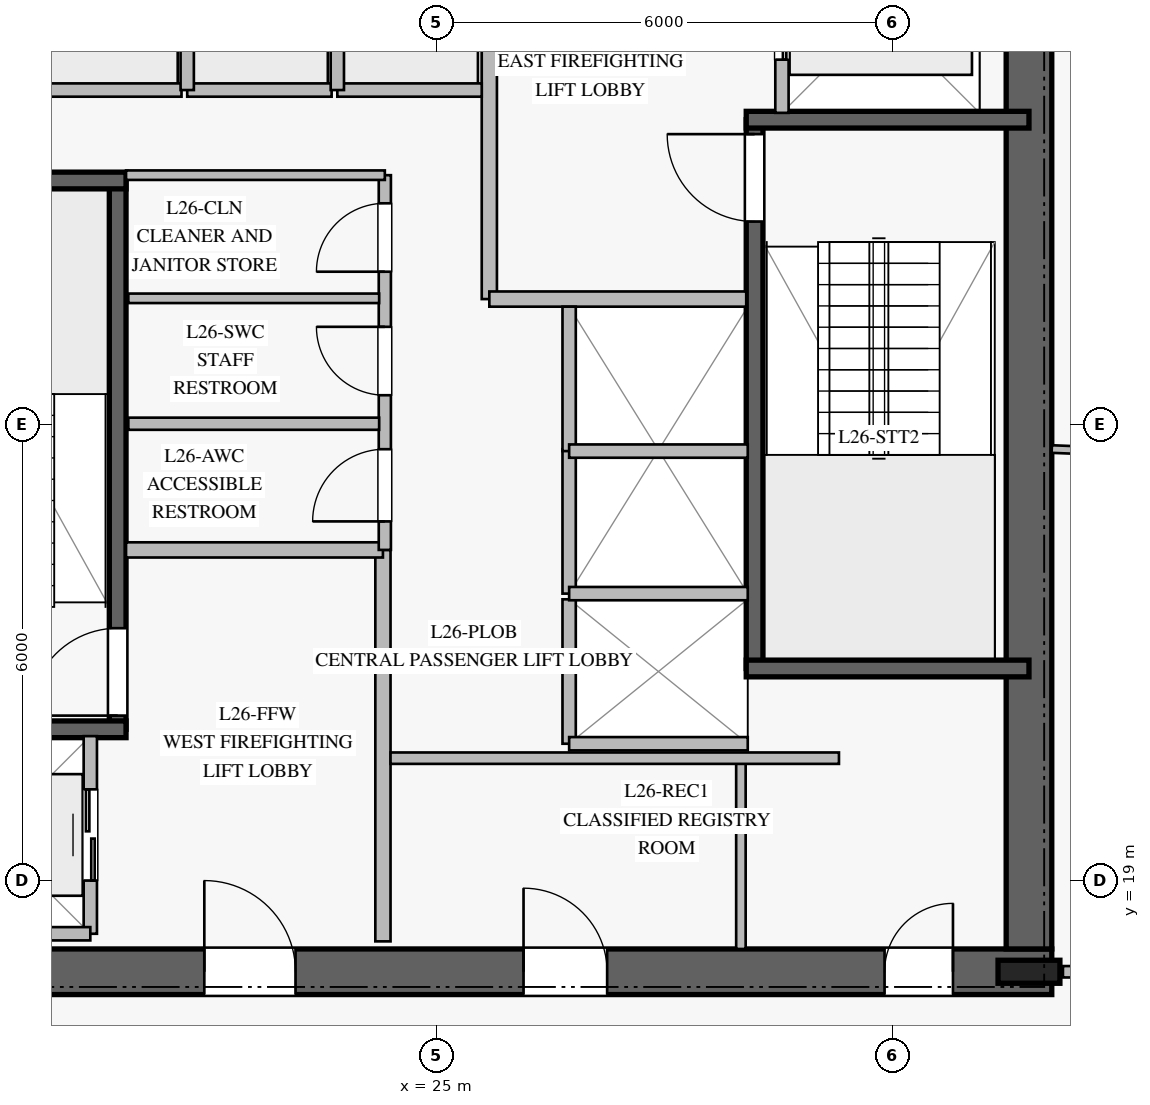
"""IFC4 building model, lengths in metres.
Left out: names, types, materials, properties, quantities, classifications, styles, units other than length and angle.
Written with IfcOpenShell. Run it as: python <this file> out.ifc"""

import sys

from ifc_helpers import new_model, si_unit, direction, frame, frame_2d, origin, origin_2d, place, context, subcontext, project, spatial, rectangle, i_section, extrude, element, fill, save


model = new_model("IFC4")
c1 = context("Model", 3, precision=1e-05, world=origin(), true_north=direction((0.0, 1.0)))
c2 = subcontext(c1, "Body", "Model", "MODEL_VIEW")
j1 = project(units=[si_unit("LENGTHUNIT", "METRE"), si_unit("PLANEANGLEUNIT", "RADIAN")], contexts=[c1])
p1 = place(None, origin())
s1 = spatial("IfcSite", under=j1, at=p1, CompositionType="ELEMENT")
p2 = place(p1, origin())
s2 = spatial("IfcBuilding", under=s1, at=p2, CompositionType="ELEMENT")
p3 = place(p2, frame((0.0, 0.0, 110.4)))
s3 = spatial("IfcBuildingStorey", under=s2, at=p3, CompositionType="ELEMENT", Elevation=110.4)
p4 = place(p3, frame((16.9, 17.8, 0.0), z_axis=(0.0, 0.0, 1.0), x_axis=(1.0, 0.0, 0.0)))
e1 = element("IfcWall", 1, at=p4, inside=s3, PredefinedType="SHEAR", context=c2, shape_type="SweptSolid", body=[
    extrude(rectangle(XDim=16.2, YDim=0.6, at=frame_2d((8.1, 0.0))), origin(), (0.0, 0.0, 1.0), 3.76),
])
p5 = place(p4, frame((5.05, 0.0, 0.0)))
e2 = element("IfcOpeningElement", 2, at=p5, cuts=e1, PredefinedType="OPENING", context=c2, shape_type="SweptSolid", body=[
    extrude(rectangle(XDim=1.2, YDim=2.25, at=frame_2d((0.6, 1.125))), frame((0.0, 0.31, 0.0), z_axis=(0.0, -1.0, 0.0), x_axis=(1.0, 0.0, 0.0)), (0.0, 0.0, 1.0), 0.62),
])
p6 = place(p4, frame((14.0, 0.0, 0.0)))
e3 = element("IfcOpeningElement", 3, at=p6, cuts=e1, PredefinedType="OPENING", context=c2, shape_type="SweptSolid", body=[
    extrude(rectangle(XDim=0.9, YDim=2.1, at=frame_2d((0.45, 1.05))), frame((0.0, 0.31, 0.0), z_axis=(0.0, -1.0, 0.0), x_axis=(1.0, 0.0, 0.0)), (0.0, 0.0, 1.0), 0.62),
])
p7 = place(p4, frame((9.25, 0.0, 0.0)))
e4 = element("IfcOpeningElement", 4, at=p7, cuts=e1, PredefinedType="OPENING", context=c2, shape_type="SweptSolid", body=[
    extrude(rectangle(XDim=1.1, YDim=2.2, at=frame_2d((0.55, 1.1))), frame((0.0, 0.31, 0.0), z_axis=(0.0, -1.0, 0.0), x_axis=(1.0, 0.0, 0.0)), (0.0, 0.0, 1.0), 0.62),
])
p8 = place(p3, frame((32.8, 18.1, 0.0), z_axis=(0.0, 0.0, 1.0), x_axis=(0.0, 1.0, 0.0)))
e5 = element("IfcWall", 5, at=p8, inside=s3, PredefinedType="SHEAR", context=c2, shape_type="SweptSolid", body=[
    extrude(rectangle(XDim=13.8, YDim=0.6, at=frame_2d((6.9, 0.0))), origin(), (0.0, 0.0, 1.0), 3.76),
])
p9 = place(p3, frame((32.8, 17.8, 0.0), z_axis=(0.0, 0.0, 1.0), x_axis=(1.0, 0.0, 0.0)))
e6 = element("IfcColumn", 6, at=p9, inside=s3, PredefinedType="COLUMN", context=c2, shape_type="SweptSolid", body=[
    extrude(i_section(OverallWidth=0.303, OverallDepth=0.814, WebThickness=0.021, FlangeThickness=0.04, at=origin_2d()), origin(), (0.0, 0.0, 1.0), 4.0),
])
p10 = place(p3, frame((20.81, 20.99, 0.0), z_axis=(0.0, 0.0, 1.0), x_axis=(0.0, 1.0, 0.0)))
e7 = element("IfcWall", 7, at=p10, inside=s3, PredefinedType="SOLIDWALL", context=c2, shape_type="SweptSolid", body=[
    extrude(rectangle(XDim=7.22, YDim=0.22, at=frame_2d((3.61, 0.0))), origin(), (0.0, 0.0, 1.0), 3.76),
])
p11 = place(p10, frame((0.18, 0.0, 0.0)))
e8 = element("IfcOpeningElement", 8, at=p11, cuts=e7, PredefinedType="OPENING", context=c2, shape_type="SweptSolid", body=[
    extrude(rectangle(XDim=1.15, YDim=2.2, at=frame_2d((0.575, 1.1))), frame((0.0, 0.12, 0.0), z_axis=(0.0, -1.0, 0.0), x_axis=(1.0, 0.0, 0.0)), (0.0, 0.0, 1.0), 0.24),
])
for number, where, z_axis, x_axis in (
    (9, (17.2, 20.99, 0.0), (0.0, 0.0, 1.0), (1.0, 0.0, 0.0)),
    (10, (17.2, 28.21, 0.0), (0.0, 0.0, 1.0), (1.0, 0.0, 0.0)),
):
    element("IfcWall", number, at=place(p3, frame(where, z_axis=z_axis, x_axis=x_axis)), inside=s3, PredefinedType="SOLIDWALL", context=c2, shape_type="SweptSolid", body=[
        extrude(rectangle(XDim=3.72, YDim=0.22, at=frame_2d((1.86, 0.0))), origin(), (0.0, 0.0, 1.0), 3.76),
    ])
p12 = place(p3, frame((29.19, 21.79, 0.0), z_axis=(0.0, 0.0, 1.0), x_axis=(0.0, 1.0, 0.0)))
e11 = element("IfcWall", 11, at=p12, inside=s3, PredefinedType="SOLIDWALL", context=c2, shape_type="SweptSolid", body=[
    extrude(rectangle(XDim=7.22, YDim=0.22, at=frame_2d((3.61, 0.0))), origin(), (0.0, 0.0, 1.0), 3.76),
])
p13 = place(p12, frame((5.88, 0.0, 0.0)))
e12 = element("IfcOpeningElement", 12, at=p13, cuts=e11, PredefinedType="OPENING", context=c2, shape_type="SweptSolid", body=[
    extrude(rectangle(XDim=1.15, YDim=2.2, at=frame_2d((0.575, 1.1))), frame((0.0, 0.12, 0.0), z_axis=(0.0, -1.0, 0.0), x_axis=(1.0, 0.0, 0.0)), (0.0, 0.0, 1.0), 0.24),
])
for number, where, z_axis, x_axis in (
    (13, (29.08, 21.79, 0.0), (0.0, 0.0, 1.0), (1.0, 0.0, 0.0)),
    (14, (29.08, 29.01, 0.0), (0.0, 0.0, 1.0), (1.0, 0.0, 0.0)),
):
    element("IfcWall", number, at=place(p3, frame(where, z_axis=z_axis, x_axis=x_axis)), inside=s3, PredefinedType="SOLIDWALL", context=c2, shape_type="SweptSolid", body=[
        extrude(rectangle(XDim=3.72, YDim=0.22, at=frame_2d((1.86, 0.0))), origin(), (0.0, 0.0, 1.0), 3.76),
    ])
p14 = place(p3, frame((24.3, 18.2, 0.0), z_axis=(0.0, 0.0, 1.0), x_axis=(0.0, 1.0, 0.0)))
e15 = element("IfcWall", 15, at=p14, inside=s3, PredefinedType="PARTITIONING", context=c2, shape_type="SweptSolid", body=[
    extrude(rectangle(XDim=5.15, YDim=0.2, at=frame_2d((2.575, 0.0))), origin(), (0.0, 0.0, 1.0), 3.76),
])
p15 = place(p3, frame((20.92, 23.35, 0.0), z_axis=(0.0, 0.0, 1.0), x_axis=(1.0, 0.0, 0.0)))
e16 = element("IfcWall", 16, at=p15, inside=s3, PredefinedType="PARTITIONING", context=c2, shape_type="SweptSolid", body=[
    extrude(rectangle(XDim=3.38, YDim=0.2, at=frame_2d((1.69, 0.0))), origin(), (0.0, 0.0, 1.0), 3.76),
])
p16 = place(p3, frame((25.7, 26.65, 0.0), z_axis=(0.0, 0.0, 1.0), x_axis=(0.0, 1.0, 0.0)))
e17 = element("IfcWall", 17, at=p16, inside=s3, PredefinedType="PARTITIONING", context=c2, shape_type="SweptSolid", body=[
    extrude(rectangle(XDim=5.15, YDim=0.2, at=frame_2d((2.575, 0.0))), origin(), (0.0, 0.0, 1.0), 3.76),
])
p17 = place(p3, frame((25.7, 26.65, 0.0), z_axis=(0.0, 0.0, 1.0), x_axis=(1.0, 0.0, 0.0)))
e18 = element("IfcWall", 18, at=p17, inside=s3, PredefinedType="PARTITIONING", context=c2, shape_type="SweptSolid", body=[
    extrude(rectangle(XDim=3.38, YDim=0.2, at=frame_2d((1.69, 0.0))), origin(), (0.0, 0.0, 1.0), 3.76),
])
p18 = place(p3, frame((24.325, 23.35, 0.0), z_axis=(0.0, 0.0, 1.0), x_axis=(0.0, 1.0, 0.0)))
e19 = element("IfcWall", 19, at=p18, inside=s3, PredefinedType="PLUMBINGWALL", context=c2, shape_type="SweptSolid", body=[
    extrude(rectangle(XDim=4.93, YDim=0.16, at=frame_2d((2.465, 0.0))), origin(), (0.0, 0.0, 1.0), 3.76),
])
p19 = place(p18, frame((0.375, 0.0, 0.0)))
e20 = element("IfcOpeningElement", 20, at=p19, cuts=e19, PredefinedType="OPENING", context=c2, shape_type="SweptSolid", body=[
    extrude(rectangle(XDim=0.95, YDim=2.1, at=frame_2d((0.475, 1.05))), frame((0.0, 0.09, 0.0), z_axis=(0.0, -1.0, 0.0), x_axis=(1.0, 0.0, 0.0)), (0.0, 0.0, 1.0), 0.18),
])
p20 = place(p18, frame((2.035, 0.0, 0.0)))
e21 = element("IfcOpeningElement", 21, at=p20, cuts=e19, PredefinedType="OPENING", context=c2, shape_type="SweptSolid", body=[
    extrude(rectangle(XDim=0.9, YDim=2.1, at=frame_2d((0.45, 1.05))), frame((0.0, 0.09, 0.0), z_axis=(0.0, -1.0, 0.0), x_axis=(1.0, 0.0, 0.0)), (0.0, 0.0, 1.0), 0.18),
])
p21 = place(p18, frame((3.66, 0.0, 0.0)))
e22 = element("IfcOpeningElement", 22, at=p21, cuts=e19, PredefinedType="OPENING", context=c2, shape_type="SweptSolid", body=[
    extrude(rectangle(XDim=0.9, YDim=2.1, at=frame_2d((0.45, 1.05))), frame((0.0, 0.09, 0.0), z_axis=(0.0, -1.0, 0.0), x_axis=(1.0, 0.0, 0.0)), (0.0, 0.0, 1.0), 0.18),
])
p22 = place(p3, frame((20.92, 28.28, 0.0), z_axis=(0.0, 0.0, 1.0), x_axis=(1.0, 0.0, 0.0)))
e23 = element("IfcWall", 23, at=p22, inside=s3, PredefinedType="PARTITIONING", context=c2, shape_type="SweptSolid", body=[
    extrude(rectangle(XDim=3.405, YDim=0.125, at=frame_2d((1.703, 0.0))), origin(), (0.0, 0.0, 1.0), 3.76),
])
p23 = place(p3, frame((29.01, 18.1, 0.0), z_axis=(0.0, 0.0, 1.0), x_axis=(0.0, 1.0, 0.0)))
e24 = element("IfcWall", 24, at=p23, inside=s3, PredefinedType="PARTITIONING", context=c2, shape_type="SweptSolid", body=[
    extrude(rectangle(XDim=2.45, YDim=0.125, at=frame_2d((1.225, 0.0))), origin(), (0.0, 0.0, 1.0), 3.76),
])
p24 = place(p3, frame((20.95, 25.01, 0.0), z_axis=(0.0, 0.0, 1.0), x_axis=(1.0, 0.0, 0.0)))
e25 = element("IfcWall", 25, at=p24, inside=s3, PredefinedType="PLUMBINGWALL", context=c2, shape_type="SweptSolid", body=[
    extrude(rectangle(XDim=3.3, YDim=0.16, at=frame_2d((1.65, 0.0))), origin(), (0.0, 0.0, 1.0), 3.76),
])
p25 = place(p3, frame((20.95, 26.66, 0.0), z_axis=(0.0, 0.0, 1.0), x_axis=(1.0, 0.0, 0.0)))
e26 = element("IfcWall", 26, at=p25, inside=s3, PredefinedType="PARTITIONING", context=c2, shape_type="SweptSolid", body=[
    extrude(rectangle(XDim=3.3, YDim=0.125, at=frame_2d((1.65, 0.0))), origin(), (0.0, 0.0, 1.0), 3.76),
])
p26 = place(p3, frame((24.4, 20.61, 0.0), z_axis=(0.0, 0.0, 1.0), x_axis=(1.0, 0.0, 0.0)))
e27 = element("IfcWall", 27, at=p26, inside=s3, PredefinedType="PARTITIONING", context=c2, shape_type="SweptSolid", body=[
    extrude(rectangle(XDim=5.9, YDim=0.15, at=frame_2d((2.95, 0.0))), origin(), (0.0, 0.0, 1.0), 3.76),
])
for number, where, z_axis, x_axis in (
    (28, (19.75, 29.4, 0.0), (0.0, 0.0, 1.0), (1.0, 0.0, 0.0)),
    (29, (21.725, 29.4, 0.0), (0.0, 0.0, 1.0), (1.0, 0.0, 0.0)),
):
    element("IfcWall", number, at=place(p3, frame(where, z_axis=z_axis, x_axis=x_axis)), inside=s3, PredefinedType="PARTITIONING", context=c2, shape_type="SweptSolid", body=[
        extrude(rectangle(XDim=1.9, YDim=0.175, at=frame_2d((0.95, 0.0))), origin(), (0.0, 0.0, 1.0), 3.76),
    ])
p27 = place(p3, frame((21.725, 29.4, 0.0), z_axis=(0.0, 0.0, 1.0), x_axis=(0.0, 1.0, 0.0)))
e30 = element("IfcWall", 30, at=p27, inside=s3, PredefinedType="PARTITIONING", context=c2, shape_type="SweptSolid", body=[
    extrude(rectangle(XDim=2.35, YDim=0.175, at=frame_2d((1.175, 0.0))), origin(), (0.0, 0.0, 1.0), 3.76),
])
p28 = place(p3, frame((23.7, 29.4, 0.0), z_axis=(0.0, 0.0, 1.0), x_axis=(1.0, 0.0, 0.0)))
e31 = element("IfcWall", 31, at=p28, inside=s3, PredefinedType="PARTITIONING", context=c2, shape_type="SweptSolid", body=[
    extrude(rectangle(XDim=1.9, YDim=0.175, at=frame_2d((0.95, 0.0))), origin(), (0.0, 0.0, 1.0), 3.76),
])
p29 = place(p3, frame((23.7, 29.4, 0.0), z_axis=(0.0, 0.0, 1.0), x_axis=(0.0, 1.0, 0.0)))
e32 = element("IfcWall", 32, at=p29, inside=s3, PredefinedType="PARTITIONING", context=c2, shape_type="SweptSolid", body=[
    extrude(rectangle(XDim=2.35, YDim=0.175, at=frame_2d((1.175, 0.0))), origin(), (0.0, 0.0, 1.0), 3.76),
])
p30 = place(p3, frame((26.75, 20.8, 0.0), z_axis=(0.0, 0.0, 1.0), x_axis=(0.0, 1.0, 0.0)))
e33 = element("IfcWall", 33, at=p30, inside=s3, PredefinedType="PARTITIONING", context=c2, shape_type="SweptSolid", body=[
    extrude(rectangle(XDim=1.9, YDim=0.175, at=frame_2d((0.95, 0.0))), origin(), (0.0, 0.0, 1.0), 3.76),
])
p31 = place(p3, frame((26.75, 20.8, 0.0), z_axis=(0.0, 0.0, 1.0), x_axis=(1.0, 0.0, 0.0)))
e34 = element("IfcWall", 34, at=p31, inside=s3, PredefinedType="PARTITIONING", context=c2, shape_type="SweptSolid", body=[
    extrude(rectangle(XDim=2.35, YDim=0.175, at=frame_2d((1.175, 0.0))), origin(), (0.0, 0.0, 1.0), 3.76),
])
p32 = place(p3, frame((26.75, 22.775, 0.0), z_axis=(0.0, 0.0, 1.0), x_axis=(0.0, 1.0, 0.0)))
e35 = element("IfcWall", 35, at=p32, inside=s3, PredefinedType="PARTITIONING", context=c2, shape_type="SweptSolid", body=[
    extrude(rectangle(XDim=1.9, YDim=0.175, at=frame_2d((0.95, 0.0))), origin(), (0.0, 0.0, 1.0), 3.76),
])
p33 = place(p3, frame((26.75, 22.775, 0.0), z_axis=(0.0, 0.0, 1.0), x_axis=(1.0, 0.0, 0.0)))
e36 = element("IfcWall", 36, at=p33, inside=s3, PredefinedType="PARTITIONING", context=c2, shape_type="SweptSolid", body=[
    extrude(rectangle(XDim=2.35, YDim=0.175, at=frame_2d((1.175, 0.0))), origin(), (0.0, 0.0, 1.0), 3.76),
])
p34 = place(p3, frame((26.75, 24.65, 0.0), z_axis=(0.0, 0.0, 1.0), x_axis=(0.0, 1.0, 0.0)))
e37 = element("IfcWall", 37, at=p34, inside=s3, PredefinedType="PARTITIONING", context=c2, shape_type="SweptSolid", body=[
    extrude(rectangle(XDim=1.9, YDim=0.175, at=frame_2d((0.95, 0.0))), origin(), (0.0, 0.0, 1.0), 3.76),
])
p35 = place(p3, frame((26.75, 24.65, 0.0), z_axis=(0.0, 0.0, 1.0), x_axis=(1.0, 0.0, 0.0)))
e38 = element("IfcWall", 38, at=p35, inside=s3, PredefinedType="PARTITIONING", context=c2, shape_type="SweptSolid", body=[
    extrude(rectangle(XDim=2.35, YDim=0.175, at=frame_2d((1.175, 0.0))), origin(), (0.0, 0.0, 1.0), 3.76),
])
p36 = place(p3, frame((20.45, 18.3, 0.0), z_axis=(0.0, 0.0, 1.0), x_axis=(0.0, 1.0, 0.0)))
e39 = element("IfcWall", 39, at=p36, inside=s3, PredefinedType="PARTITIONING", context=c2, shape_type="SweptSolid", body=[
    extrude(rectangle(XDim=2.6, YDim=0.175, at=frame_2d((1.3, 0.0))), origin(), (0.0, 0.0, 1.0), 3.76),
])
p37 = place(p36, frame((0.7, 0.0, 0.0)))
e40 = element("IfcOpeningElement", 40, at=p37, cuts=e39, PredefinedType="OPENING", context=c2, shape_type="SweptSolid", body=[
    extrude(rectangle(XDim=1.2, YDim=2.2, at=frame_2d((0.6, 1.1))), frame((0.0, 0.098, 0.0), z_axis=(0.0, -1.0, 0.0), x_axis=(1.0, 0.0, 0.0)), (0.0, 0.0, 1.0), 0.195),
])
p38 = place(p3, frame((17.85, 18.3, 0.0), z_axis=(0.0, 0.0, 1.0), x_axis=(1.0, 0.0, 0.0)))
e41 = element("IfcWall", 41, at=p38, inside=s3, PredefinedType="PARTITIONING", context=c2, shape_type="SweptSolid", body=[
    extrude(rectangle(XDim=2.6, YDim=0.175, at=frame_2d((1.3, 0.0))), origin(), (0.0, 0.0, 1.0), 3.76),
])
p39 = place(p3, frame((29.55, 29.1, 0.0), z_axis=(0.0, 0.0, 1.0), x_axis=(0.0, 1.0, 0.0)))
e42 = element("IfcWall", 42, at=p39, inside=s3, PredefinedType="PARTITIONING", context=c2, shape_type="SweptSolid", body=[
    extrude(rectangle(XDim=2.6, YDim=0.175, at=frame_2d((1.3, 0.0))), origin(), (0.0, 0.0, 1.0), 3.76),
])
p40 = place(p39, frame((0.7, 0.0, 0.0)))
e43 = element("IfcOpeningElement", 43, at=p40, cuts=e42, PredefinedType="OPENING", context=c2, shape_type="SweptSolid", body=[
    extrude(rectangle(XDim=1.2, YDim=2.2, at=frame_2d((0.6, 1.1))), frame((0.0, 0.098, 0.0), z_axis=(0.0, -1.0, 0.0), x_axis=(1.0, 0.0, 0.0)), (0.0, 0.0, 1.0), 0.195),
])
p41 = place(p3, frame((33.247, 17.8, 0.0), z_axis=(0.0, 0.0, 1.0), x_axis=(1.0, 0.0, 0.0)))
e44 = element("IfcWall", 44, at=p41, inside=s3, PredefinedType="PARTITIONING", context=c2, shape_type="SweptSolid", body=[
    extrude(rectangle(XDim=7.953, YDim=0.15, at=frame_2d((3.977, 0.0))), origin(), (0.0, 0.0, 1.0), 3.05),
])
p42 = place(p41, frame((3.338, 0.0, 0.0)))
e45 = element("IfcOpeningElement", 45, at=p42, cuts=e44, PredefinedType="OPENING", context=c2, shape_type="SweptSolid", body=[
    extrude(rectangle(XDim=1.1, YDim=2.2, at=frame_2d((0.55, 1.1))), frame((0.0, 0.085, 0.0), z_axis=(0.0, -1.0, 0.0), x_axis=(1.0, 0.0, 0.0)), (0.0, 0.0, 1.0), 0.17),
])
p43 = place(p3, frame((33.1, 24.677, 0.0), z_axis=(0.0, 0.0, 1.0), x_axis=(0.999206030208, -0.039841049127, 0.0)))
e46 = element("IfcWall", 46, at=p43, inside=s3, PredefinedType="MOVABLE", context=c2, shape_type="SweptSolid", body=[
    extrude(rectangle(XDim=11.747, YDim=0.1, at=frame_2d((5.874, 0.0))), origin(), (0.0, 0.0, 1.0), 3.05),
])
p44 = place(p11, origin())
e47 = element("IfcDoor", 47, at=p44, inside=s3, OperationType="SINGLE_SWING_LEFT", PredefinedType="DOOR", context=c2, shape_type="SweptSolid", body=[
    extrude(rectangle(XDim=1.15, YDim=2.2, at=frame_2d((0.575, 1.1))), frame((0.0, 0.025, 0.0), z_axis=(0.0, -1.0, 0.0), x_axis=(1.0, 0.0, 0.0)), (0.0, 0.0, 1.0), 0.05),
])
fill(e8, e47)
p45 = place(p13, origin())
e48 = element("IfcDoor", 48, at=p45, inside=s3, OperationType="SINGLE_SWING_RIGHT", PredefinedType="DOOR", context=c2, shape_type="SweptSolid", body=[
    extrude(rectangle(XDim=1.15, YDim=2.2, at=frame_2d((0.575, 1.1))), frame((0.0, 0.025, 0.0), z_axis=(0.0, -1.0, 0.0), x_axis=(1.0, 0.0, 0.0)), (0.0, 0.0, 1.0), 0.05),
])
fill(e12, e48)
p46 = place(p5, origin())
e49 = element("IfcDoor", 49, at=p46, inside=s3, OperationType="SINGLE_SWING_LEFT", PredefinedType="DOOR", context=c2, shape_type="SweptSolid", body=[
    extrude(rectangle(XDim=1.2, YDim=2.25, at=frame_2d((0.6, 1.125))), frame((0.0, 0.025, 0.0), z_axis=(0.0, -1.0, 0.0), x_axis=(1.0, 0.0, 0.0)), (0.0, 0.0, 1.0), 0.05),
])
fill(e2, e49)
p47 = place(p19, origin())
e50 = element("IfcDoor", 50, at=p47, inside=s3, OperationType="SINGLE_SWING_LEFT", PredefinedType="DOOR", context=c2, shape_type="SweptSolid", body=[
    extrude(rectangle(XDim=0.95, YDim=2.1, at=frame_2d((0.475, 1.05))), frame((0.0, 0.025, 0.0), z_axis=(0.0, -1.0, 0.0), x_axis=(1.0, 0.0, 0.0)), (0.0, 0.0, 1.0), 0.05),
])
fill(e20, e50)
p48 = place(p20, origin())
e51 = element("IfcDoor", 51, at=p48, inside=s3, OperationType="SINGLE_SWING_RIGHT", PredefinedType="DOOR", context=c2, shape_type="SweptSolid", body=[
    extrude(rectangle(XDim=0.9, YDim=2.1, at=frame_2d((0.45, 1.05))), frame((0.0, 0.025, 0.0), z_axis=(0.0, -1.0, 0.0), x_axis=(1.0, 0.0, 0.0)), (0.0, 0.0, 1.0), 0.05),
])
fill(e21, e51)
p49 = place(p21, origin())
e52 = element("IfcDoor", 52, at=p49, inside=s3, OperationType="SINGLE_SWING_LEFT", PredefinedType="DOOR", context=c2, shape_type="SweptSolid", body=[
    extrude(rectangle(XDim=0.9, YDim=2.1, at=frame_2d((0.45, 1.05))), frame((0.0, 0.025, 0.0), z_axis=(0.0, -1.0, 0.0), x_axis=(1.0, 0.0, 0.0)), (0.0, 0.0, 1.0), 0.05),
])
fill(e22, e52)
p50 = place(p6, origin())
e53 = element("IfcDoor", 53, at=p50, inside=s3, OperationType="SINGLE_SWING_RIGHT", PredefinedType="DOOR", context=c2, shape_type="SweptSolid", body=[
    extrude(rectangle(XDim=0.9, YDim=2.1, at=frame_2d((0.45, 1.05))), frame((0.0, 0.025, 0.0), z_axis=(0.0, -1.0, 0.0), x_axis=(1.0, 0.0, 0.0)), (0.0, 0.0, 1.0), 0.05),
])
fill(e3, e53)
p51 = place(p7, origin())
e54 = element("IfcDoor", 54, at=p51, inside=s3, OperationType="SINGLE_SWING_LEFT", PredefinedType="DOOR", context=c2, shape_type="SweptSolid", body=[
    extrude(rectangle(XDim=1.1, YDim=2.2, at=frame_2d((0.55, 1.1))), frame((0.0, 0.025, 0.0), z_axis=(0.0, -1.0, 0.0), x_axis=(1.0, 0.0, 0.0)), (0.0, 0.0, 1.0), 0.05),
])
fill(e4, e54)
p52 = place(p37, origin())
e55 = element("IfcDoor", 55, at=p52, inside=s3, OperationType="DOUBLE_DOOR_SLIDING", PredefinedType="DOOR", context=c2, shape_type="SweptSolid", body=[
    extrude(rectangle(XDim=1.2, YDim=2.2, at=frame_2d((0.6, 1.1))), frame((0.0, 0.025, 0.0), z_axis=(0.0, -1.0, 0.0), x_axis=(1.0, 0.0, 0.0)), (0.0, 0.0, 1.0), 0.05),
])
fill(e40, e55)
p53 = place(p40, origin())
e56 = element("IfcDoor", 56, at=p53, inside=s3, OperationType="DOUBLE_DOOR_SLIDING", PredefinedType="DOOR", context=c2, shape_type="SweptSolid", body=[
    extrude(rectangle(XDim=1.2, YDim=2.2, at=frame_2d((0.6, 1.1))), frame((0.0, 0.025, 0.0), z_axis=(0.0, -1.0, 0.0), x_axis=(1.0, 0.0, 0.0)), (0.0, 0.0, 1.0), 0.05),
])
fill(e43, e56)
save(model, sys.argv[1])
